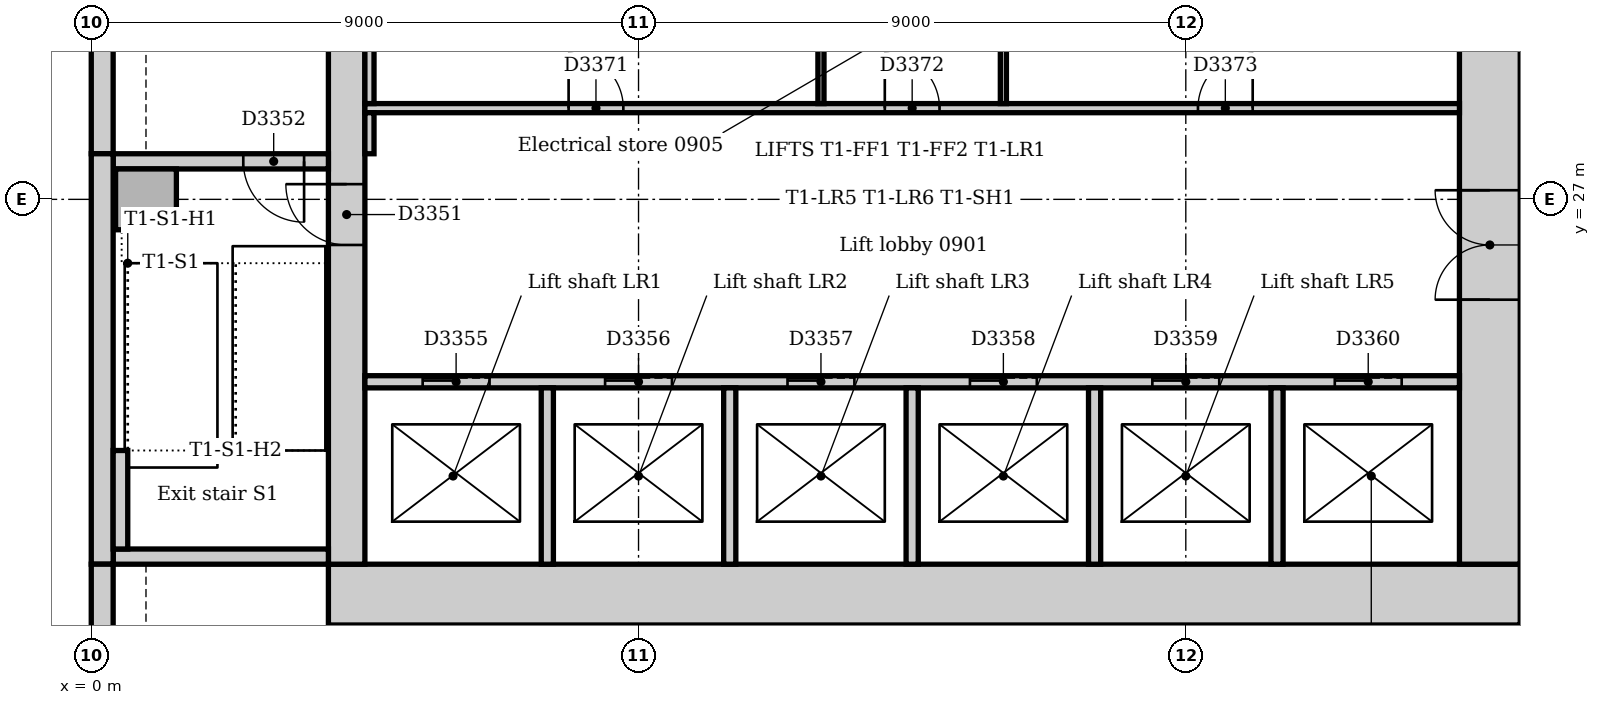
"""IFC4 building model, lengths in metres.
Left out: names, types, materials, properties, quantities, classifications, styles, units other than length and angle.
Written with IfcOpenShell. Run it as: python <this file> out.ifc"""

import sys

from ifc_helpers import new_model, si_unit, direction, frame, frame_2d, origin, origin_2d, place, context, subcontext, project, spatial, rectangle, extrude, element, fill, save


model = new_model("IFC4")
c1 = context("Model", 3, precision=1e-05, world=origin(), true_north=direction((0.0, 1.0)))
c2 = subcontext(c1, "Body", "Model", "MODEL_VIEW")
j1 = project(units=[si_unit("LENGTHUNIT", "METRE"), si_unit("PLANEANGLEUNIT", "RADIAN")], contexts=[c1])
p1 = place(None, origin())
s1 = spatial("IfcSite", under=j1, at=p1, CompositionType="ELEMENT")
p2 = place(p1, origin())
s2 = spatial("IfcBuilding", under=s1, at=p2, CompositionType="ELEMENT")
p3 = place(p2, frame((0.0, 0.0, 42.0)))
s3 = spatial("IfcBuildingStorey", under=s2, at=p3, CompositionType="ELEMENT", Elevation=42.0)
p4 = place(p3, frame((3.9, 20.5, 0.0), z_axis=(0.0, 0.0, 1.0), x_axis=(1.0, 0.0, 0.0)))
e1 = element("IfcWall", 1, at=p4, inside=s3, PredefinedType="SOLIDWALL", context=c2, shape_type="SweptSolid", body=[
    extrude(rectangle(XDim=19.6, YDim=1.0, at=frame_2d((9.8, 0.0))), origin(), (0.0, 0.0, 1.0), 4.0),
])
p5 = place(p3, frame((23.0, 21.0, 0.0), z_axis=(0.0, 0.0, 1.0), x_axis=(0.0, 1.0, 0.0)))
e2 = element("IfcWall", 2, at=p5, inside=s3, PredefinedType="SOLIDWALL", context=c2, shape_type="SweptSolid", body=[
    extrude(rectangle(XDim=10.5, YDim=1.0, at=frame_2d((5.25, 0.0))), origin(), (0.0, 0.0, 1.0), 4.0),
])
p6 = place(p5, frame((4.35, 0.0, 0.0)))
e3 = element("IfcOpeningElement", 3, at=p6, cuts=e2, PredefinedType="OPENING", context=c2, shape_type="SweptSolid", body=[
    extrude(rectangle(XDim=1.8, YDim=2.1, at=frame_2d((0.9, 1.05))), frame((0.0, 0.51, 0.0), z_axis=(0.0, -1.0, 0.0), x_axis=(1.0, 0.0, 0.0)), (0.0, 0.0, 1.0), 1.02),
])
p7 = place(p3, frame((4.2, 31.5, 0.0), z_axis=(0.0, 0.0, 1.0), x_axis=(0.0, -1.0, 0.0)))
e4 = element("IfcWall", 4, at=p7, inside=s3, PredefinedType="SOLIDWALL", context=c2, shape_type="SweptSolid", body=[
    extrude(rectangle(XDim=10.5, YDim=0.6, at=frame_2d((5.25, 0.0))), origin(), (0.0, 0.0, 1.0), 4.0),
])
p8 = place(p7, frame((4.25, 0.0, 0.0)))
e5 = element("IfcOpeningElement", 5, at=p8, cuts=e4, PredefinedType="OPENING", context=c2, shape_type="SweptSolid", body=[
    extrude(rectangle(XDim=1.0, YDim=2.1, at=frame_2d((0.5, 1.05))), frame((0.0, 0.31, 0.0), z_axis=(0.0, -1.0, 0.0), x_axis=(1.0, 0.0, 0.0)), (0.0, 0.0, 1.0), 0.62),
])
p9 = place(p3, frame((0.36, 21.125, 0.0), z_axis=(0.0, 0.0, 1.0), x_axis=(1.0, 0.0, 0.0)))
e6 = element("IfcWall", 6, at=p9, inside=s3, PredefinedType="SOLIDWALL", context=c2, shape_type="SweptSolid", body=[
    extrude(rectangle(XDim=3.54, YDim=0.25, at=frame_2d((1.77, 0.0))), origin(), (0.0, 0.0, 1.0), 4.0),
])
p10 = place(p3, frame((3.9, 27.625, 0.0), z_axis=(0.0, 0.0, 1.0), x_axis=(-1.0, 0.0, 0.0)))
e7 = element("IfcWall", 7, at=p10, inside=s3, PredefinedType="SOLIDWALL", context=c2, shape_type="SweptSolid", body=[
    extrude(rectangle(XDim=3.54, YDim=0.25, at=frame_2d((1.77, 0.0))), origin(), (0.0, 0.0, 1.0), 4.0),
])
p11 = place(p10, frame((0.4, 0.0, 0.0)))
e8 = element("IfcOpeningElement", 8, at=p11, cuts=e7, PredefinedType="OPENING", context=c2, shape_type="SweptSolid", body=[
    extrude(rectangle(XDim=1.0, YDim=2.1, at=frame_2d((0.5, 1.05))), frame((0.0, 0.135, 0.0), z_axis=(0.0, -1.0, 0.0), x_axis=(1.0, 0.0, 0.0)), (0.0, 0.0, 1.0), 0.27),
])
p12 = place(p3, frame((0.9, 27.0, 0.0), z_axis=(0.0, 0.0, 1.0), x_axis=(1.0, 0.0, 0.0)))
e9 = element("IfcColumn", 9, at=p12, inside=s3, PredefinedType="COLUMN", context=c2, shape_type="SweptSolid", body=[
    extrude(rectangle(XDim=1.0, YDim=1.0, at=origin_2d()), origin(), (0.0, 0.0, 1.0), 4.0),
])
p13 = place(p3, frame((0.18, 35.25, 0.0), z_axis=(0.0, 0.0, 1.0), x_axis=(0.0, -1.0, 0.0)))
e10 = element("IfcWall", 10, at=p13, inside=s3, PredefinedType="STANDARD", context=c2, shape_type="SweptSolid", body=[
    extrude(rectangle(XDim=7.5, YDim=0.36, at=frame_2d((3.75, 0.0))), origin(), (0.0, 0.0, 1.0), 3.7),
])
p14 = place(p3, frame((0.18, 27.75, 0.0), z_axis=(0.0, 0.0, 1.0), x_axis=(0.0, -1.0, 0.0)))
e11 = element("IfcWall", 11, at=p14, inside=s3, PredefinedType="STANDARD", context=c2, shape_type="SweptSolid", body=[
    extrude(rectangle(XDim=6.75, YDim=0.36, at=frame_2d((3.375, 0.0))), origin(), (0.0, 0.0, 1.0), 3.7),
])
p15 = place(p3, frame((0.18, 21.0, 0.0), z_axis=(0.0, 0.0, 1.0), x_axis=(0.0, -1.0, 0.0)))
e12 = element("IfcWall", 12, at=p15, inside=s3, PredefinedType="STANDARD", context=c2, shape_type="SweptSolid", body=[
    extrude(rectangle(XDim=16.757, YDim=0.36, at=frame_2d((8.379, 0.0))), origin(), (0.0, 0.0, 1.0), 3.7),
])
p16 = place(p15, frame((1.35, 0.0, 0.9)))
e13 = element("IfcOpeningElement", 13, at=p16, cuts=e12, PredefinedType="OPENING", context=c2, shape_type="SweptSolid", body=[
    extrude(rectangle(XDim=3.3, YDim=1.6, at=frame_2d((1.65, 0.8))), frame((0.0, 0.19, 0.0), z_axis=(0.0, -1.0, 0.0), x_axis=(1.0, 0.0, 0.0)), (0.0, 0.0, 1.0), 0.38),
])
p17 = place(p15, frame((5.85, 0.0, 0.9)))
e14 = element("IfcOpeningElement", 14, at=p17, cuts=e12, PredefinedType="OPENING", context=c2, shape_type="SweptSolid", body=[
    extrude(rectangle(XDim=3.3, YDim=1.6, at=frame_2d((1.65, 0.8))), frame((0.0, 0.19, 0.0), z_axis=(0.0, -1.0, 0.0), x_axis=(1.0, 0.0, 0.0)), (0.0, 0.0, 1.0), 0.38),
])
p18 = place(p15, frame((10.35, 0.0, 0.9)))
e15 = element("IfcOpeningElement", 15, at=p18, cuts=e12, PredefinedType="OPENING", context=c2, shape_type="SweptSolid", body=[
    extrude(rectangle(XDim=3.3, YDim=1.6, at=frame_2d((1.65, 0.8))), frame((0.0, 0.19, 0.0), z_axis=(0.0, -1.0, 0.0), x_axis=(1.0, 0.0, 0.0)), (0.0, 0.0, 1.0), 0.38),
])
p19 = place(p3, frame((0.48, 21.25, 0.0), z_axis=(0.0, 0.0, 1.0), x_axis=(0.0, 1.0, 0.0)))
e16 = element("IfcWall", 16, at=p19, inside=s3, PredefinedType="STANDARD", context=c2, shape_type="SweptSolid", body=[
    extrude(rectangle(XDim=1.62, YDim=0.24, at=frame_2d((0.81, 0.0))), origin(), (0.0, 0.0, 1.0), 4.0),
])
p20 = place(p3, frame((4.5, 24.0, 0.0), z_axis=(0.0, 0.0, 1.0), x_axis=(1.0, 0.0, 0.0)))
e17 = element("IfcWall", 17, at=p20, inside=s3, PredefinedType="PARTITIONING", context=c2, shape_type="SweptSolid", body=[
    extrude(rectangle(XDim=18.0, YDim=0.2, at=frame_2d((9.0, 0.0))), origin(), (0.0, 0.0, 1.0), 3.7),
])
p21 = place(p20, frame((0.95, 0.0, 0.0)))
e18 = element("IfcOpeningElement", 18, at=p21, cuts=e17, PredefinedType="OPENING", context=c2, shape_type="SweptSolid", body=[
    extrude(rectangle(XDim=1.1, YDim=2.1, at=frame_2d((0.55, 1.05))), frame((0.0, 0.11, 0.0), z_axis=(0.0, -1.0, 0.0), x_axis=(1.0, 0.0, 0.0)), (0.0, 0.0, 1.0), 0.22),
])
p22 = place(p20, frame((3.95, 0.0, 0.0)))
e19 = element("IfcOpeningElement", 19, at=p22, cuts=e17, PredefinedType="OPENING", context=c2, shape_type="SweptSolid", body=[
    extrude(rectangle(XDim=1.1, YDim=2.1, at=frame_2d((0.55, 1.05))), frame((0.0, 0.11, 0.0), z_axis=(0.0, -1.0, 0.0), x_axis=(1.0, 0.0, 0.0)), (0.0, 0.0, 1.0), 0.22),
])
p23 = place(p20, frame((6.95, 0.0, 0.0)))
e20 = element("IfcOpeningElement", 20, at=p23, cuts=e17, PredefinedType="OPENING", context=c2, shape_type="SweptSolid", body=[
    extrude(rectangle(XDim=1.1, YDim=2.1, at=frame_2d((0.55, 1.05))), frame((0.0, 0.11, 0.0), z_axis=(0.0, -1.0, 0.0), x_axis=(1.0, 0.0, 0.0)), (0.0, 0.0, 1.0), 0.22),
])
p24 = place(p20, frame((9.95, 0.0, 0.0)))
e21 = element("IfcOpeningElement", 21, at=p24, cuts=e17, PredefinedType="OPENING", context=c2, shape_type="SweptSolid", body=[
    extrude(rectangle(XDim=1.1, YDim=2.1, at=frame_2d((0.55, 1.05))), frame((0.0, 0.11, 0.0), z_axis=(0.0, -1.0, 0.0), x_axis=(1.0, 0.0, 0.0)), (0.0, 0.0, 1.0), 0.22),
])
p25 = place(p20, frame((12.95, 0.0, 0.0)))
e22 = element("IfcOpeningElement", 22, at=p25, cuts=e17, PredefinedType="OPENING", context=c2, shape_type="SweptSolid", body=[
    extrude(rectangle(XDim=1.1, YDim=2.1, at=frame_2d((0.55, 1.05))), frame((0.0, 0.11, 0.0), z_axis=(0.0, -1.0, 0.0), x_axis=(1.0, 0.0, 0.0)), (0.0, 0.0, 1.0), 0.22),
])
p26 = place(p20, frame((15.95, 0.0, 0.0)))
e23 = element("IfcOpeningElement", 23, at=p26, cuts=e17, PredefinedType="OPENING", context=c2, shape_type="SweptSolid", body=[
    extrude(rectangle(XDim=1.1, YDim=2.1, at=frame_2d((0.55, 1.05))), frame((0.0, 0.11, 0.0), z_axis=(0.0, -1.0, 0.0), x_axis=(1.0, 0.0, 0.0)), (0.0, 0.0, 1.0), 0.22),
])
for number, where, z_axis, x_axis in (
    (24, (7.5, 21.0, 0.0), (0.0, 0.0, 1.0), (0.0, 1.0, 0.0)),
    (25, (10.5, 21.0, 0.0), (0.0, 0.0, 1.0), (0.0, 1.0, 0.0)),
    (26, (13.5, 21.0, 0.0), (0.0, 0.0, 1.0), (0.0, 1.0, 0.0)),
    (27, (16.5, 21.0, 0.0), (0.0, 0.0, 1.0), (0.0, 1.0, 0.0)),
    (28, (19.5, 21.0, 0.0), (0.0, 0.0, 1.0), (0.0, 1.0, 0.0)),
):
    element("IfcWall", number, at=place(p3, frame(where, z_axis=z_axis, x_axis=x_axis)), inside=s3, PredefinedType="PARTITIONING", context=c2, shape_type="SweptSolid", body=[
        extrude(rectangle(XDim=2.9, YDim=0.2, at=frame_2d((1.45, 0.0))), origin(), (0.0, 0.0, 1.0), 3.7),
    ])
p27 = place(p3, frame((4.5, 28.5, 0.0), z_axis=(0.0, 0.0, 1.0), x_axis=(1.0, 0.0, 0.0)))
e29 = element("IfcWall", 29, at=p27, inside=s3, PredefinedType="PARTITIONING", context=c2, shape_type="SweptSolid", body=[
    extrude(rectangle(XDim=18.0, YDim=0.15, at=frame_2d((9.0, 0.0))), origin(), (0.0, 0.0, 1.0), 3.7),
])
p28 = place(p27, frame((3.35, 0.0, 0.0)))
e30 = element("IfcOpeningElement", 30, at=p28, cuts=e29, PredefinedType="OPENING", context=c2, shape_type="SweptSolid", body=[
    extrude(rectangle(XDim=0.9, YDim=2.1, at=frame_2d((0.45, 1.05))), frame((0.0, 0.085, 0.0), z_axis=(0.0, -1.0, 0.0), x_axis=(1.0, 0.0, 0.0)), (0.0, 0.0, 1.0), 0.17),
])
p29 = place(p27, frame((8.55, 0.0, 0.0)))
e31 = element("IfcOpeningElement", 31, at=p29, cuts=e29, PredefinedType="OPENING", context=c2, shape_type="SweptSolid", body=[
    extrude(rectangle(XDim=0.9, YDim=2.1, at=frame_2d((0.45, 1.05))), frame((0.0, 0.085, 0.0), z_axis=(0.0, -1.0, 0.0), x_axis=(1.0, 0.0, 0.0)), (0.0, 0.0, 1.0), 0.17),
])
p30 = place(p27, frame((13.7, 0.0, 0.0)))
e32 = element("IfcOpeningElement", 32, at=p30, cuts=e29, PredefinedType="OPENING", context=c2, shape_type="SweptSolid", body=[
    extrude(rectangle(XDim=0.9, YDim=2.1, at=frame_2d((0.45, 1.05))), frame((0.0, 0.085, 0.0), z_axis=(0.0, -1.0, 0.0), x_axis=(1.0, 0.0, 0.0)), (0.0, 0.0, 1.0), 0.17),
])
p31 = place(p3, frame((4.575, 27.75, 0.0), z_axis=(0.0, 0.0, 1.0), x_axis=(0.0, 1.0, 0.0)))
e33 = element("IfcWall", 33, at=p31, inside=s3, PredefinedType="PARTITIONING", context=c2, shape_type="SweptSolid", body=[
    extrude(rectangle(XDim=0.675, YDim=0.15, at=frame_2d((0.338, 0.0))), origin(), (0.0, 0.0, 1.0), 3.7),
])
p32 = place(p3, frame((4.575, 28.575, 0.0), z_axis=(0.0, 0.0, 1.0), x_axis=(0.0, 1.0, 0.0)))
e34 = element("IfcWall", 34, at=p32, inside=s3, PredefinedType="PARTITIONING", context=c2, shape_type="SweptSolid", body=[
    extrude(rectangle(XDim=2.675, YDim=0.15, at=frame_2d((1.337, 0.0))), origin(), (0.0, 0.0, 1.0), 3.7),
])
for number, where, z_axis, x_axis in (
    (35, (12.0, 28.575, 0.0), (0.0, 0.0, 1.0), (0.0, 1.0, 0.0)),
    (36, (15.0, 28.575, 0.0), (0.0, 0.0, 1.0), (0.0, 1.0, 0.0)),
):
    element("IfcWall", number, at=place(p3, frame(where, z_axis=z_axis, x_axis=x_axis)), inside=s3, PredefinedType="PARTITIONING", context=c2, shape_type="SweptSolid", body=[
        extrude(rectangle(XDim=2.675, YDim=0.1, at=frame_2d((1.337, 0.0))), origin(), (0.0, 0.0, 1.0), 3.7),
    ])
p33 = place(p8, frame((1.0, 0.0, 0.0), z_axis=(0.0, 0.0, 1.0), x_axis=(-1.0, 0.0, 0.0)))
e37 = element("IfcDoor", 37, at=p33, inside=s3, OperationType="SINGLE_SWING_RIGHT", PredefinedType="DOOR", context=c2, shape_type="SweptSolid", body=[
    extrude(rectangle(XDim=1.0, YDim=2.1, at=frame_2d((0.5, 1.05))), frame((0.0, 0.025, 0.0), z_axis=(0.0, -1.0, 0.0), x_axis=(1.0, 0.0, 0.0)), (0.0, 0.0, 1.0), 0.05),
])
fill(e5, e37)
p34 = place(p11, origin())
e38 = element("IfcDoor", 38, at=p34, inside=s3, OperationType="SINGLE_SWING_LEFT", PredefinedType="DOOR", context=c2, shape_type="SweptSolid", body=[
    extrude(rectangle(XDim=1.0, YDim=2.1, at=frame_2d((0.5, 1.05))), frame((0.0, 0.025, 0.0), z_axis=(0.0, -1.0, 0.0), x_axis=(1.0, 0.0, 0.0)), (0.0, 0.0, 1.0), 0.05),
])
fill(e8, e38)
p35 = place(p21, origin())
e39 = element("IfcDoor", 39, at=p35, inside=s3, OperationType="SLIDING_TO_LEFT", PredefinedType="DOOR", context=c2, shape_type="SweptSolid", body=[
    extrude(rectangle(XDim=1.1, YDim=2.1, at=frame_2d((0.55, 1.05))), frame((0.0, 0.025, 0.0), z_axis=(0.0, -1.0, 0.0), x_axis=(1.0, 0.0, 0.0)), (0.0, 0.0, 1.0), 0.05),
])
fill(e18, e39)
p36 = place(p22, origin())
e40 = element("IfcDoor", 40, at=p36, inside=s3, OperationType="SLIDING_TO_LEFT", PredefinedType="DOOR", context=c2, shape_type="SweptSolid", body=[
    extrude(rectangle(XDim=1.1, YDim=2.1, at=frame_2d((0.55, 1.05))), frame((0.0, 0.025, 0.0), z_axis=(0.0, -1.0, 0.0), x_axis=(1.0, 0.0, 0.0)), (0.0, 0.0, 1.0), 0.05),
])
fill(e19, e40)
p37 = place(p23, origin())
e41 = element("IfcDoor", 41, at=p37, inside=s3, OperationType="SLIDING_TO_LEFT", PredefinedType="DOOR", context=c2, shape_type="SweptSolid", body=[
    extrude(rectangle(XDim=1.1, YDim=2.1, at=frame_2d((0.55, 1.05))), frame((0.0, 0.025, 0.0), z_axis=(0.0, -1.0, 0.0), x_axis=(1.0, 0.0, 0.0)), (0.0, 0.0, 1.0), 0.05),
])
fill(e20, e41)
p38 = place(p24, origin())
e42 = element("IfcDoor", 42, at=p38, inside=s3, OperationType="SLIDING_TO_LEFT", PredefinedType="DOOR", context=c2, shape_type="SweptSolid", body=[
    extrude(rectangle(XDim=1.1, YDim=2.1, at=frame_2d((0.55, 1.05))), frame((0.0, 0.025, 0.0), z_axis=(0.0, -1.0, 0.0), x_axis=(1.0, 0.0, 0.0)), (0.0, 0.0, 1.0), 0.05),
])
fill(e21, e42)
p39 = place(p25, origin())
e43 = element("IfcDoor", 43, at=p39, inside=s3, OperationType="SLIDING_TO_LEFT", PredefinedType="DOOR", context=c2, shape_type="SweptSolid", body=[
    extrude(rectangle(XDim=1.1, YDim=2.1, at=frame_2d((0.55, 1.05))), frame((0.0, 0.025, 0.0), z_axis=(0.0, -1.0, 0.0), x_axis=(1.0, 0.0, 0.0)), (0.0, 0.0, 1.0), 0.05),
])
fill(e22, e43)
p40 = place(p26, origin())
e44 = element("IfcDoor", 44, at=p40, inside=s3, OperationType="SLIDING_TO_LEFT", PredefinedType="DOOR", context=c2, shape_type="SweptSolid", body=[
    extrude(rectangle(XDim=1.1, YDim=2.1, at=frame_2d((0.55, 1.05))), frame((0.0, 0.025, 0.0), z_axis=(0.0, -1.0, 0.0), x_axis=(1.0, 0.0, 0.0)), (0.0, 0.0, 1.0), 0.05),
])
fill(e23, e44)
p41 = place(p6, origin())
e45 = element("IfcDoor", 45, at=p41, inside=s3, OperationType="DOUBLE_DOOR_DOUBLE_SWING", PredefinedType="DOOR", context=c2, shape_type="SweptSolid", body=[
    extrude(rectangle(XDim=1.8, YDim=2.1, at=frame_2d((0.9, 1.05))), frame((0.0, 0.025, 0.0), z_axis=(0.0, -1.0, 0.0), x_axis=(1.0, 0.0, 0.0)), (0.0, 0.0, 1.0), 0.05),
])
fill(e3, e45)
p42 = place(p28, origin())
e46 = element("IfcDoor", 46, at=p42, inside=s3, OperationType="SINGLE_SWING_LEFT", PredefinedType="DOOR", context=c2, shape_type="SweptSolid", body=[
    extrude(rectangle(XDim=0.9, YDim=2.1, at=frame_2d((0.45, 1.05))), frame((0.0, 0.025, 0.0), z_axis=(0.0, -1.0, 0.0), x_axis=(1.0, 0.0, 0.0)), (0.0, 0.0, 1.0), 0.05),
])
fill(e30, e46)
p43 = place(p29, origin())
e47 = element("IfcDoor", 47, at=p43, inside=s3, OperationType="SINGLE_SWING_LEFT", PredefinedType="DOOR", context=c2, shape_type="SweptSolid", body=[
    extrude(rectangle(XDim=0.9, YDim=2.1, at=frame_2d((0.45, 1.05))), frame((0.0, 0.025, 0.0), z_axis=(0.0, -1.0, 0.0), x_axis=(1.0, 0.0, 0.0)), (0.0, 0.0, 1.0), 0.05),
])
fill(e31, e47)
p44 = place(p30, origin())
e48 = element("IfcDoor", 48, at=p44, inside=s3, OperationType="SINGLE_SWING_RIGHT", PredefinedType="DOOR", context=c2, shape_type="SweptSolid", body=[
    extrude(rectangle(XDim=0.9, YDim=2.1, at=frame_2d((0.45, 1.05))), frame((0.0, 0.025, 0.0), z_axis=(0.0, -1.0, 0.0), x_axis=(1.0, 0.0, 0.0)), (0.0, 0.0, 1.0), 0.05),
])
fill(e32, e48)
save(model, sys.argv[1])
